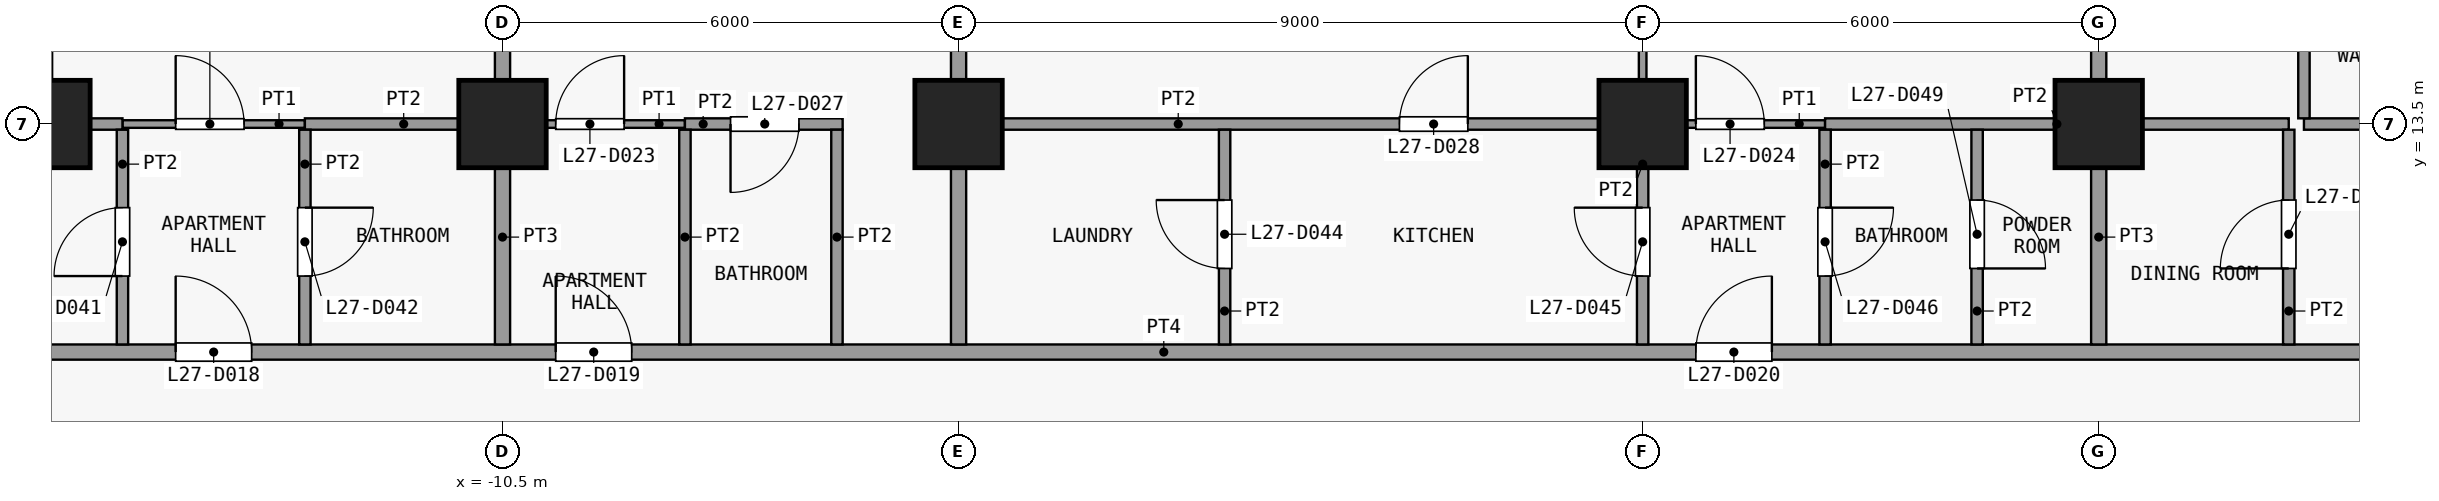
"""IFC4 building model, lengths in metres.
Left out: names, types, materials, properties, quantities, classifications, styles, units other than length and angle.
Written with IfcOpenShell. Run it as: python <this file> out.ifc"""

import sys

from ifc_helpers import new_model, si_unit, direction, frame, frame_2d, origin, origin_2d, place, context, subcontext, project, spatial, rectangle, extrude, element, fill, save


model = new_model("IFC4")
c1 = context("Model", 3, precision=1e-05, world=origin(), true_north=direction((0.0, 1.0)))
c2 = subcontext(c1, "Body", "Model", "MODEL_VIEW")
j1 = project(units=[si_unit("LENGTHUNIT", "METRE"), si_unit("PLANEANGLEUNIT", "RADIAN")], contexts=[c1])
p1 = place(None, origin())
s1 = spatial("IfcSite", under=j1, at=p1, CompositionType="ELEMENT")
p2 = place(p1, origin())
s2 = spatial("IfcBuilding", under=s1, at=p2, CompositionType="ELEMENT")
p3 = place(p2, frame((0.0, 0.0, 109.9)))
s3 = spatial("IfcBuildingStorey", under=s2, at=p3, CompositionType="ELEMENT", Elevation=109.9)
for number, where, z_axis, x_axis in (
    (1, (-16.5, 13.5, 0.0), (0.0, 0.0, 1.0), (1.0, 0.0, 0.0)),
    (2, (-10.5, 13.5, 0.0), (0.0, 0.0, 1.0), (1.0, 0.0, 0.0)),
    (3, (-4.5, 13.5, 0.0), (0.0, 0.0, 1.0), (1.0, 0.0, 0.0)),
    (4, (4.5, 13.5, 0.0), (0.0, 0.0, 1.0), (1.0, 0.0, 0.0)),
    (5, (10.5, 13.5, 0.0), (0.0, 0.0, 1.0), (1.0, 0.0, 0.0)),
):
    element("IfcColumn", number, at=place(p3, frame(where, z_axis=z_axis, x_axis=x_axis)), inside=s3, PredefinedType="COLUMN", context=c2, shape_type="SweptSolid", body=[
        extrude(rectangle(XDim=1.15, YDim=1.15, at=origin_2d()), origin(), (0.0, 0.0, 1.0), 3.6),
    ])
p4 = place(p3, frame((-23.85, 10.5, 0.0), z_axis=(0.0, 0.0, 1.0), x_axis=(1.0, 0.0, 0.0)))
e6 = element("IfcWall", 6, at=p4, inside=s3, PredefinedType="PARTITIONING", context=c2, shape_type="SweptSolid", body=[
    extrude(rectangle(XDim=47.7, YDim=0.2, at=frame_2d((23.85, 0.0))), origin(), (0.0, 0.0, 1.0), 3.3),
])
p5 = place(p4, frame((9.05, 0.0, 0.0)))
e7 = element("IfcOpeningElement", 7, at=p5, cuts=e6, PredefinedType="OPENING", context=c2, shape_type="SweptSolid", body=[
    extrude(rectangle(XDim=1.0, YDim=2.1, at=frame_2d((0.5, 1.05))), frame((0.0, 0.11, 0.0), z_axis=(0.0, -1.0, 0.0), x_axis=(1.0, 0.0, 0.0)), (0.0, 0.0, 1.0), 0.22),
])
p6 = place(p4, frame((14.05, 0.0, 0.0)))
e8 = element("IfcOpeningElement", 8, at=p6, cuts=e6, PredefinedType="OPENING", context=c2, shape_type="SweptSolid", body=[
    extrude(rectangle(XDim=1.0, YDim=2.1, at=frame_2d((0.5, 1.05))), frame((0.0, 0.11, 0.0), z_axis=(0.0, -1.0, 0.0), x_axis=(1.0, 0.0, 0.0)), (0.0, 0.0, 1.0), 0.22),
])
p7 = place(p4, frame((29.05, 0.0, 0.0)))
e9 = element("IfcOpeningElement", 9, at=p7, cuts=e6, PredefinedType="OPENING", context=c2, shape_type="SweptSolid", body=[
    extrude(rectangle(XDim=1.0, YDim=2.1, at=frame_2d((0.5, 1.05))), frame((0.0, 0.11, 0.0), z_axis=(0.0, -1.0, 0.0), x_axis=(1.0, 0.0, 0.0)), (0.0, 0.0, 1.0), 0.22),
])
p8 = place(p4, frame((41.05, 0.0, 0.0)))
e10 = element("IfcOpeningElement", 10, at=p8, cuts=e6, PredefinedType="OPENING", context=c2, shape_type="SweptSolid", body=[
    extrude(rectangle(XDim=1.0, YDim=2.1, at=frame_2d((0.5, 1.05))), frame((0.0, 0.11, 0.0), z_axis=(0.0, -1.0, 0.0), x_axis=(1.0, 0.0, 0.0)), (0.0, 0.0, 1.0), 0.22),
])
p9 = place(p3, frame((-15.5, 13.5, 0.0), z_axis=(0.0, 0.0, 1.0), x_axis=(1.0, 0.0, 0.0)))
e11 = element("IfcWall", 11, at=p9, inside=s3, PredefinedType="PARTITIONING", context=c2, shape_type="SweptSolid", body=[
    extrude(rectangle(XDim=2.4, YDim=0.1, at=frame_2d((1.2, 0.0))), origin(), (0.0, 0.0, 1.0), 3.3),
])
p10 = place(p9, frame((0.7, 0.0, 0.0)))
e12 = element("IfcOpeningElement", 12, at=p10, cuts=e11, PredefinedType="OPENING", context=c2, shape_type="SweptSolid", body=[
    extrude(rectangle(XDim=0.9, YDim=2.1, at=frame_2d((0.45, 1.05))), frame((0.0, 0.06, 0.0), z_axis=(0.0, -1.0, 0.0), x_axis=(1.0, 0.0, 0.0)), (0.0, 0.0, 1.0), 0.12),
])
p11 = place(p3, frame((-10.5, 13.5, 0.0), z_axis=(0.0, 0.0, 1.0), x_axis=(1.0, 0.0, 0.0)))
e13 = element("IfcWall", 13, at=p11, inside=s3, PredefinedType="PARTITIONING", context=c2, shape_type="SweptSolid", body=[
    extrude(rectangle(XDim=2.4, YDim=0.1, at=frame_2d((1.2, 0.0))), origin(), (0.0, 0.0, 1.0), 3.3),
])
p12 = place(p11, frame((0.7, 0.0, 0.0)))
e14 = element("IfcOpeningElement", 14, at=p12, cuts=e13, PredefinedType="OPENING", context=c2, shape_type="SweptSolid", body=[
    extrude(rectangle(XDim=0.9, YDim=2.1, at=frame_2d((0.45, 1.05))), frame((0.0, 0.06, 0.0), z_axis=(0.0, -1.0, 0.0), x_axis=(1.0, 0.0, 0.0)), (0.0, 0.0, 1.0), 0.12),
])
p13 = place(p3, frame((4.5, 13.5, 0.0), z_axis=(0.0, 0.0, 1.0), x_axis=(1.0, 0.0, 0.0)))
e15 = element("IfcWall", 15, at=p13, inside=s3, PredefinedType="PARTITIONING", context=c2, shape_type="SweptSolid", body=[
    extrude(rectangle(XDim=2.4, YDim=0.1, at=frame_2d((1.2, 0.0))), origin(), (0.0, 0.0, 1.0), 3.3),
])
p14 = place(p13, frame((0.7, 0.0, 0.0)))
e16 = element("IfcOpeningElement", 16, at=p14, cuts=e15, PredefinedType="OPENING", context=c2, shape_type="SweptSolid", body=[
    extrude(rectangle(XDim=0.9, YDim=2.1, at=frame_2d((0.45, 1.05))), frame((0.0, 0.06, 0.0), z_axis=(0.0, -1.0, 0.0), x_axis=(1.0, 0.0, 0.0)), (0.0, 0.0, 1.0), 0.12),
])
p15 = place(p3, frame((-23.85, 13.5, 0.0), z_axis=(0.0, 0.0, 1.0), x_axis=(1.0, 0.0, 0.0)))
e17 = element("IfcWall", 17, at=p15, inside=s3, PredefinedType="PARTITIONING", context=c2, shape_type="SweptSolid", body=[
    extrude(rectangle(XDim=8.35, YDim=0.15, at=frame_2d((4.175, 0.0))), origin(), (0.0, 0.0, 1.0), 3.3),
])
p16 = place(p15, frame((2.0, 0.0, 0.0)))
e18 = element("IfcOpeningElement", 18, at=p16, cuts=e17, PredefinedType="OPENING", context=c2, shape_type="SweptSolid", body=[
    extrude(rectangle(XDim=0.9, YDim=2.1, at=frame_2d((0.45, 1.05))), frame((0.0, 0.085, 0.0), z_axis=(0.0, -1.0, 0.0), x_axis=(1.0, 0.0, 0.0)), (0.0, 0.0, 1.0), 0.17),
])
p17 = place(p3, frame((-13.1, 13.5, 0.0), z_axis=(0.0, 0.0, 1.0), x_axis=(1.0, 0.0, 0.0)))
e19 = element("IfcWall", 19, at=p17, inside=s3, PredefinedType="PARTITIONING", context=c2, shape_type="SweptSolid", body=[
    extrude(rectangle(XDim=2.6, YDim=0.15, at=frame_2d((1.3, 0.0))), origin(), (0.0, 0.0, 1.0), 3.3),
])
p18 = place(p3, frame((-8.1, 13.5, 0.0), z_axis=(0.0, 0.0, 1.0), x_axis=(1.0, 0.0, 0.0)))
e20 = element("IfcWall", 20, at=p18, inside=s3, PredefinedType="PARTITIONING", context=c2, shape_type="SweptSolid", body=[
    extrude(rectangle(XDim=2.075, YDim=0.15, at=frame_2d((1.038, 0.0))), origin(), (0.0, 0.0, 1.0), 3.3),
])
p19 = place(p18, frame((0.6, 0.0, 0.0)))
e21 = element("IfcOpeningElement", 21, at=p19, cuts=e20, PredefinedType="OPENING", context=c2, shape_type="SweptSolid", body=[
    extrude(rectangle(XDim=0.9, YDim=2.1, at=frame_2d((0.45, 1.05))), frame((0.0, 0.085, 0.0), z_axis=(0.0, -1.0, 0.0), x_axis=(1.0, 0.0, 0.0)), (0.0, 0.0, 1.0), 0.17),
])
p20 = place(p3, frame((-4.4, 13.5, 0.0), z_axis=(0.0, 0.0, 1.0), x_axis=(1.0, 0.0, 0.0)))
e22 = element("IfcWall", 22, at=p20, inside=s3, PredefinedType="PARTITIONING", context=c2, shape_type="SweptSolid", body=[
    extrude(rectangle(XDim=8.9, YDim=0.15, at=frame_2d((4.45, 0.0))), origin(), (0.0, 0.0, 1.0), 3.3),
])
p21 = place(p20, frame((5.7, 0.0, 0.0)))
e23 = element("IfcOpeningElement", 23, at=p21, cuts=e22, PredefinedType="OPENING", context=c2, shape_type="SweptSolid", body=[
    extrude(rectangle(XDim=0.9, YDim=2.1, at=frame_2d((0.45, 1.05))), frame((0.0, 0.085, 0.0), z_axis=(0.0, -1.0, 0.0), x_axis=(1.0, 0.0, 0.0)), (0.0, 0.0, 1.0), 0.17),
])
p22 = place(p3, frame((6.9, 13.5, 0.0), z_axis=(0.0, 0.0, 1.0), x_axis=(1.0, 0.0, 0.0)))
e24 = element("IfcWall", 24, at=p22, inside=s3, PredefinedType="PARTITIONING", context=c2, shape_type="SweptSolid", body=[
    extrude(rectangle(XDim=6.1, YDim=0.15, at=frame_2d((3.05, 0.0))), origin(), (0.0, 0.0, 1.0), 3.3),
])
p23 = place(p3, frame((13.2, 13.5, 0.0), z_axis=(0.0, 0.0, 1.0), x_axis=(1.0, 0.0, 0.0)))
e25 = element("IfcWall", 25, at=p23, inside=s3, PredefinedType="PARTITIONING", context=c2, shape_type="SweptSolid", body=[
    extrude(rectangle(XDim=3.3, YDim=0.15, at=frame_2d((1.65, 0.0))), origin(), (0.0, 0.0, 1.0), 3.3),
])
p24 = place(p3, frame((-15.5, 10.6, 0.0), z_axis=(0.0, 0.0, 1.0), x_axis=(0.0, 1.0, 0.0)))
e26 = element("IfcWall", 26, at=p24, inside=s3, PredefinedType="PARTITIONING", context=c2, shape_type="SweptSolid", body=[
    extrude(rectangle(XDim=2.825, YDim=0.15, at=frame_2d((1.413, 0.0))), origin(), (0.0, 0.0, 1.0), 3.3),
])
p25 = place(p24, frame((0.9, 0.0, 0.0)))
e27 = element("IfcOpeningElement", 27, at=p25, cuts=e26, PredefinedType="OPENING", context=c2, shape_type="SweptSolid", body=[
    extrude(rectangle(XDim=0.9, YDim=2.1, at=frame_2d((0.45, 1.05))), frame((0.0, 0.085, 0.0), z_axis=(0.0, -1.0, 0.0), x_axis=(1.0, 0.0, 0.0)), (0.0, 0.0, 1.0), 0.17),
])
p26 = place(p3, frame((-13.1, 10.6, 0.0), z_axis=(0.0, 0.0, 1.0), x_axis=(0.0, 1.0, 0.0)))
e28 = element("IfcWall", 28, at=p26, inside=s3, PredefinedType="PARTITIONING", context=c2, shape_type="SweptSolid", body=[
    extrude(rectangle(XDim=2.825, YDim=0.15, at=frame_2d((1.413, 0.0))), origin(), (0.0, 0.0, 1.0), 3.3),
])
p27 = place(p26, frame((0.9, 0.0, 0.0)))
e29 = element("IfcOpeningElement", 29, at=p27, cuts=e28, PredefinedType="OPENING", context=c2, shape_type="SweptSolid", body=[
    extrude(rectangle(XDim=0.9, YDim=2.1, at=frame_2d((0.45, 1.05))), frame((0.0, 0.085, 0.0), z_axis=(0.0, -1.0, 0.0), x_axis=(1.0, 0.0, 0.0)), (0.0, 0.0, 1.0), 0.17),
])
p28 = place(p3, frame((-10.5, 10.6, 0.0), z_axis=(0.0, 0.0, 1.0), x_axis=(0.0, 1.0, 0.0)))
e30 = element("IfcWall", 30, at=p28, inside=s3, PredefinedType="PARTITIONING", context=c2, shape_type="SweptSolid", body=[
    extrude(rectangle(XDim=2.825, YDim=0.2, at=frame_2d((1.413, 0.0))), origin(), (0.0, 0.0, 1.0), 3.3),
])
p29 = place(p3, frame((-10.5, 13.575, 0.0), z_axis=(0.0, 0.0, 1.0), x_axis=(0.0, 1.0, 0.0)))
e31 = element("IfcWall", 31, at=p29, inside=s3, PredefinedType="PARTITIONING", context=c2, shape_type="SweptSolid", body=[
    extrude(rectangle(XDim=7.275, YDim=0.2, at=frame_2d((3.638, 0.0))), origin(), (0.0, 0.0, 1.0), 3.3),
])
for number, where, z_axis, x_axis in (
    (32, (-8.1, 10.6, 0.0), (0.0, 0.0, 1.0), (0.0, 1.0, 0.0)),
    (33, (-6.1, 10.6, 0.0), (0.0, 0.0, 1.0), (0.0, 1.0, 0.0)),
):
    element("IfcWall", number, at=place(p3, frame(where, z_axis=z_axis, x_axis=x_axis)), inside=s3, PredefinedType="PARTITIONING", context=c2, shape_type="SweptSolid", body=[
        extrude(rectangle(XDim=2.825, YDim=0.15, at=frame_2d((1.413, 0.0))), origin(), (0.0, 0.0, 1.0), 3.3),
    ])
p30 = place(p3, frame((-4.5, 10.6, 0.0), z_axis=(0.0, 0.0, 1.0), x_axis=(0.0, 1.0, 0.0)))
e34 = element("IfcWall", 34, at=p30, inside=s3, PredefinedType="PARTITIONING", context=c2, shape_type="SweptSolid", body=[
    extrude(rectangle(XDim=10.25, YDim=0.2, at=frame_2d((5.125, 0.0))), origin(), (0.0, 0.0, 1.0), 3.3),
])
p31 = place(p3, frame((-1.0, 10.6, 0.0), z_axis=(0.0, 0.0, 1.0), x_axis=(0.0, 1.0, 0.0)))
e35 = element("IfcWall", 35, at=p31, inside=s3, PredefinedType="PARTITIONING", context=c2, shape_type="SweptSolid", body=[
    extrude(rectangle(XDim=2.825, YDim=0.15, at=frame_2d((1.413, 0.0))), origin(), (0.0, 0.0, 1.0), 3.3),
])
p32 = place(p31, frame((1.0, 0.0, 0.0)))
e36 = element("IfcOpeningElement", 36, at=p32, cuts=e35, PredefinedType="OPENING", context=c2, shape_type="SweptSolid", body=[
    extrude(rectangle(XDim=0.9, YDim=2.1, at=frame_2d((0.45, 1.05))), frame((0.0, 0.085, 0.0), z_axis=(0.0, -1.0, 0.0), x_axis=(1.0, 0.0, 0.0)), (0.0, 0.0, 1.0), 0.17),
])
p33 = place(p3, frame((4.5, 13.575, 0.0), z_axis=(0.0, 0.0, 1.0), x_axis=(0.0, 1.0, 0.0)))
e37 = element("IfcWall", 37, at=p33, inside=s3, PredefinedType="PARTITIONING", context=c2, shape_type="SweptSolid", body=[
    extrude(rectangle(XDim=7.275, YDim=0.1, at=frame_2d((3.638, 0.0))), origin(), (0.0, 0.0, 1.0), 3.3),
])
p34 = place(p3, frame((4.5, 10.6, 0.0), z_axis=(0.0, 0.0, 1.0), x_axis=(0.0, 1.0, 0.0)))
e38 = element("IfcWall", 38, at=p34, inside=s3, PredefinedType="PARTITIONING", context=c2, shape_type="SweptSolid", body=[
    extrude(rectangle(XDim=2.825, YDim=0.15, at=frame_2d((1.413, 0.0))), origin(), (0.0, 0.0, 1.0), 3.3),
])
p35 = place(p34, frame((0.9, 0.0, 0.0)))
e39 = element("IfcOpeningElement", 39, at=p35, cuts=e38, PredefinedType="OPENING", context=c2, shape_type="SweptSolid", body=[
    extrude(rectangle(XDim=0.9, YDim=2.1, at=frame_2d((0.45, 1.05))), frame((0.0, 0.085, 0.0), z_axis=(0.0, -1.0, 0.0), x_axis=(1.0, 0.0, 0.0)), (0.0, 0.0, 1.0), 0.17),
])
p36 = place(p3, frame((6.9, 10.6, 0.0), z_axis=(0.0, 0.0, 1.0), x_axis=(0.0, 1.0, 0.0)))
e40 = element("IfcWall", 40, at=p36, inside=s3, PredefinedType="PARTITIONING", context=c2, shape_type="SweptSolid", body=[
    extrude(rectangle(XDim=2.825, YDim=0.15, at=frame_2d((1.413, 0.0))), origin(), (0.0, 0.0, 1.0), 3.3),
])
p37 = place(p36, frame((0.9, 0.0, 0.0)))
e41 = element("IfcOpeningElement", 41, at=p37, cuts=e40, PredefinedType="OPENING", context=c2, shape_type="SweptSolid", body=[
    extrude(rectangle(XDim=0.9, YDim=2.1, at=frame_2d((0.45, 1.05))), frame((0.0, 0.085, 0.0), z_axis=(0.0, -1.0, 0.0), x_axis=(1.0, 0.0, 0.0)), (0.0, 0.0, 1.0), 0.17),
])
p38 = place(p3, frame((8.9, 10.6, 0.0), z_axis=(0.0, 0.0, 1.0), x_axis=(0.0, 1.0, 0.0)))
e42 = element("IfcWall", 42, at=p38, inside=s3, PredefinedType="PARTITIONING", context=c2, shape_type="SweptSolid", body=[
    extrude(rectangle(XDim=2.825, YDim=0.15, at=frame_2d((1.413, 0.0))), origin(), (0.0, 0.0, 1.0), 3.3),
])
p39 = place(p38, frame((1.0, 0.0, 0.0)))
e43 = element("IfcOpeningElement", 43, at=p39, cuts=e42, PredefinedType="OPENING", context=c2, shape_type="SweptSolid", body=[
    extrude(rectangle(XDim=0.9, YDim=2.1, at=frame_2d((0.45, 1.05))), frame((0.0, 0.085, 0.0), z_axis=(0.0, -1.0, 0.0), x_axis=(1.0, 0.0, 0.0)), (0.0, 0.0, 1.0), 0.17),
])
p40 = place(p3, frame((10.5, 10.6, 0.0), z_axis=(0.0, 0.0, 1.0), x_axis=(0.0, 1.0, 0.0)))
e44 = element("IfcWall", 44, at=p40, inside=s3, PredefinedType="PARTITIONING", context=c2, shape_type="SweptSolid", body=[
    extrude(rectangle(XDim=2.825, YDim=0.2, at=frame_2d((1.413, 0.0))), origin(), (0.0, 0.0, 1.0), 3.3),
])
p41 = place(p3, frame((10.5, 13.575, 0.0), z_axis=(0.0, 0.0, 1.0), x_axis=(0.0, 1.0, 0.0)))
e45 = element("IfcWall", 45, at=p41, inside=s3, PredefinedType="PARTITIONING", context=c2, shape_type="SweptSolid", body=[
    extrude(rectangle(XDim=8.675, YDim=0.2, at=frame_2d((4.337, 0.0))), origin(), (0.0, 0.0, 1.0), 3.3),
])
p42 = place(p3, frame((13.0, 10.6, 0.0), z_axis=(0.0, 0.0, 1.0), x_axis=(0.0, 1.0, 0.0)))
e46 = element("IfcWall", 46, at=p42, inside=s3, PredefinedType="PARTITIONING", context=c2, shape_type="SweptSolid", body=[
    extrude(rectangle(XDim=2.825, YDim=0.15, at=frame_2d((1.413, 0.0))), origin(), (0.0, 0.0, 1.0), 3.3),
])
p43 = place(p42, frame((1.0, 0.0, 0.0)))
e47 = element("IfcOpeningElement", 47, at=p43, cuts=e46, PredefinedType="OPENING", context=c2, shape_type="SweptSolid", body=[
    extrude(rectangle(XDim=0.9, YDim=2.1, at=frame_2d((0.45, 1.05))), frame((0.0, 0.085, 0.0), z_axis=(0.0, -1.0, 0.0), x_axis=(1.0, 0.0, 0.0)), (0.0, 0.0, 1.0), 0.17),
])
p44 = place(p3, frame((13.2, 13.575, 0.0), z_axis=(0.0, 0.0, 1.0), x_axis=(0.0, 1.0, 0.0)))
e48 = element("IfcWall", 48, at=p44, inside=s3, PredefinedType="PARTITIONING", context=c2, shape_type="SweptSolid", body=[
    extrude(rectangle(XDim=2.6, YDim=0.15, at=frame_2d((1.3, 0.0))), origin(), (0.0, 0.0, 1.0), 3.3),
])
p45 = place(p5, origin())
e49 = element("IfcDoor", 49, at=p45, inside=s3, OperationType="SINGLE_SWING_RIGHT", PredefinedType="DOOR", context=c2, shape_type="SweptSolid", body=[
    extrude(rectangle(XDim=1.0, YDim=2.1, at=frame_2d((0.5, 1.05))), frame((0.0, 0.025, 0.0), z_axis=(0.0, -1.0, 0.0), x_axis=(1.0, 0.0, 0.0)), (0.0, 0.0, 1.0), 0.05),
])
fill(e7, e49)
p46 = place(p6, origin())
e50 = element("IfcDoor", 50, at=p46, inside=s3, OperationType="SINGLE_SWING_RIGHT", PredefinedType="DOOR", context=c2, shape_type="SweptSolid", body=[
    extrude(rectangle(XDim=1.0, YDim=2.1, at=frame_2d((0.5, 1.05))), frame((0.0, 0.025, 0.0), z_axis=(0.0, -1.0, 0.0), x_axis=(1.0, 0.0, 0.0)), (0.0, 0.0, 1.0), 0.05),
])
fill(e8, e50)
p47 = place(p7, origin())
e51 = element("IfcDoor", 51, at=p47, inside=s3, OperationType="SINGLE_SWING_LEFT", PredefinedType="DOOR", context=c2, shape_type="SweptSolid", body=[
    extrude(rectangle(XDim=1.0, YDim=2.1, at=frame_2d((0.5, 1.05))), frame((0.0, 0.025, 0.0), z_axis=(0.0, -1.0, 0.0), x_axis=(1.0, 0.0, 0.0)), (0.0, 0.0, 1.0), 0.05),
])
fill(e9, e51)
p48 = place(p10, origin())
e52 = element("IfcDoor", 52, at=p48, inside=s3, OperationType="SINGLE_SWING_RIGHT", PredefinedType="DOOR", context=c2, shape_type="SweptSolid", body=[
    extrude(rectangle(XDim=0.9, YDim=2.1, at=frame_2d((0.45, 1.05))), frame((0.0, 0.025, 0.0), z_axis=(0.0, -1.0, 0.0), x_axis=(1.0, 0.0, 0.0)), (0.0, 0.0, 1.0), 0.05),
])
fill(e12, e52)
p49 = place(p12, origin())
e53 = element("IfcDoor", 53, at=p49, inside=s3, OperationType="SINGLE_SWING_LEFT", PredefinedType="DOOR", context=c2, shape_type="SweptSolid", body=[
    extrude(rectangle(XDim=0.9, YDim=2.1, at=frame_2d((0.45, 1.05))), frame((0.0, 0.025, 0.0), z_axis=(0.0, -1.0, 0.0), x_axis=(1.0, 0.0, 0.0)), (0.0, 0.0, 1.0), 0.05),
])
fill(e14, e53)
p50 = place(p14, origin())
e54 = element("IfcDoor", 54, at=p50, inside=s3, OperationType="SINGLE_SWING_RIGHT", PredefinedType="DOOR", context=c2, shape_type="SweptSolid", body=[
    extrude(rectangle(XDim=0.9, YDim=2.1, at=frame_2d((0.45, 1.05))), frame((0.0, 0.025, 0.0), z_axis=(0.0, -1.0, 0.0), x_axis=(1.0, 0.0, 0.0)), (0.0, 0.0, 1.0), 0.05),
])
fill(e16, e54)
p51 = place(p19, origin())
e55 = element("IfcDoor", 55, at=p51, inside=s3, OperationType="SINGLE_SWING_LEFT", PredefinedType="DOOR", context=c2, shape_type="SweptSolid", body=[
    extrude(rectangle(XDim=0.9, YDim=2.1, at=frame_2d((0.45, 1.05))), frame((0.0, 0.025, 0.0), z_axis=(0.0, -1.0, 0.0), x_axis=(1.0, 0.0, 0.0)), (0.0, 0.0, 1.0), 0.05),
])
fill(e21, e55)
p52 = place(p21, origin())
e56 = element("IfcDoor", 56, at=p52, inside=s3, OperationType="SINGLE_SWING_LEFT", PredefinedType="DOOR", context=c2, shape_type="SweptSolid", body=[
    extrude(rectangle(XDim=0.9, YDim=2.1, at=frame_2d((0.45, 1.05))), frame((0.0, 0.025, 0.0), z_axis=(0.0, -1.0, 0.0), x_axis=(1.0, 0.0, 0.0)), (0.0, 0.0, 1.0), 0.05),
])
fill(e23, e56)
p53 = place(p25, origin())
e57 = element("IfcDoor", 57, at=p53, inside=s3, OperationType="SINGLE_SWING_RIGHT", PredefinedType="DOOR", context=c2, shape_type="SweptSolid", body=[
    extrude(rectangle(XDim=0.9, YDim=2.1, at=frame_2d((0.45, 1.05))), frame((0.0, 0.025, 0.0), z_axis=(0.0, -1.0, 0.0), x_axis=(1.0, 0.0, 0.0)), (0.0, 0.0, 1.0), 0.05),
])
fill(e27, e57)
p54 = place(p27, origin())
e58 = element("IfcDoor", 58, at=p54, inside=s3, OperationType="SINGLE_SWING_RIGHT", PredefinedType="DOOR", context=c2, shape_type="SweptSolid", body=[
    extrude(rectangle(XDim=0.9, YDim=2.1, at=frame_2d((0.45, 1.05))), frame((0.0, 0.025, 0.0), z_axis=(0.0, -1.0, 0.0), x_axis=(1.0, 0.0, 0.0)), (0.0, 0.0, 1.0), 0.05),
])
fill(e29, e58)
p55 = place(p32, origin())
e59 = element("IfcDoor", 59, at=p55, inside=s3, OperationType="SINGLE_SWING_LEFT", PredefinedType="DOOR", context=c2, shape_type="SweptSolid", body=[
    extrude(rectangle(XDim=0.9, YDim=2.1, at=frame_2d((0.45, 1.05))), frame((0.0, 0.025, 0.0), z_axis=(0.0, -1.0, 0.0), x_axis=(1.0, 0.0, 0.0)), (0.0, 0.0, 1.0), 0.05),
])
fill(e36, e59)
p56 = place(p35, origin())
e60 = element("IfcDoor", 60, at=p56, inside=s3, OperationType="SINGLE_SWING_LEFT", PredefinedType="DOOR", context=c2, shape_type="SweptSolid", body=[
    extrude(rectangle(XDim=0.9, YDim=2.1, at=frame_2d((0.45, 1.05))), frame((0.0, 0.025, 0.0), z_axis=(0.0, -1.0, 0.0), x_axis=(1.0, 0.0, 0.0)), (0.0, 0.0, 1.0), 0.05),
])
fill(e39, e60)
p57 = place(p37, origin())
e61 = element("IfcDoor", 61, at=p57, inside=s3, OperationType="SINGLE_SWING_RIGHT", PredefinedType="DOOR", context=c2, shape_type="SweptSolid", body=[
    extrude(rectangle(XDim=0.9, YDim=2.1, at=frame_2d((0.45, 1.05))), frame((0.0, 0.025, 0.0), z_axis=(0.0, -1.0, 0.0), x_axis=(1.0, 0.0, 0.0)), (0.0, 0.0, 1.0), 0.05),
])
fill(e41, e61)
p58 = place(p39, origin())
e62 = element("IfcDoor", 62, at=p58, inside=s3, OperationType="SINGLE_SWING_LEFT", PredefinedType="DOOR", context=c2, shape_type="SweptSolid", body=[
    extrude(rectangle(XDim=0.9, YDim=2.1, at=frame_2d((0.45, 1.05))), frame((0.0, 0.025, 0.0), z_axis=(0.0, -1.0, 0.0), x_axis=(1.0, 0.0, 0.0)), (0.0, 0.0, 1.0), 0.05),
])
fill(e43, e62)
p59 = place(p43, origin())
e63 = element("IfcDoor", 63, at=p59, inside=s3, OperationType="SINGLE_SWING_RIGHT", PredefinedType="DOOR", context=c2, shape_type="SweptSolid", body=[
    extrude(rectangle(XDim=0.9, YDim=2.1, at=frame_2d((0.45, 1.05))), frame((0.0, 0.025, 0.0), z_axis=(0.0, -1.0, 0.0), x_axis=(1.0, 0.0, 0.0)), (0.0, 0.0, 1.0), 0.05),
])
fill(e47, e63)
save(model, sys.argv[1])
